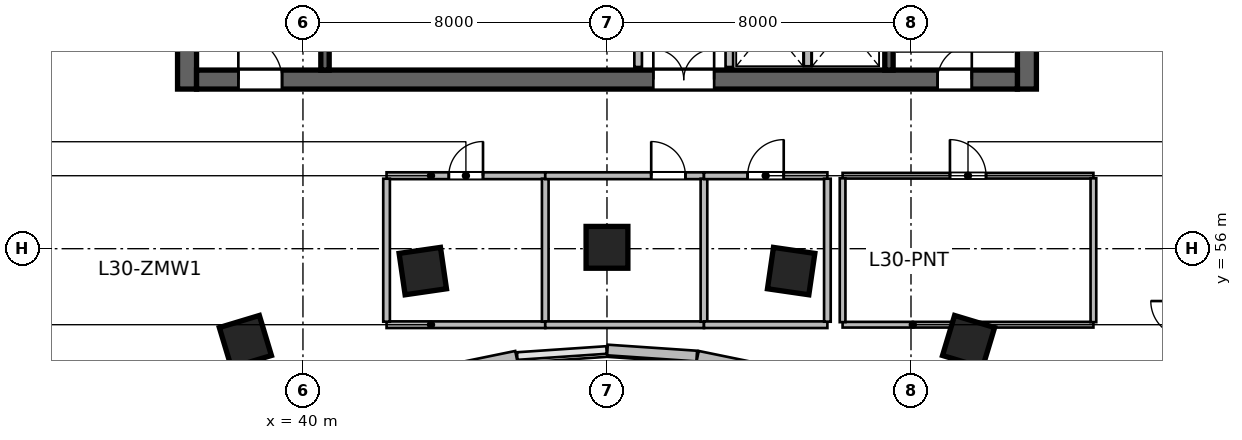
"""IFC4 building model, lengths in metres.
Left out: names, types, materials, properties, quantities, classifications, styles, units other than length and angle.
Written with IfcOpenShell. Run it as: python <this file> out.ifc"""

import sys

from ifc_helpers import new_model, si_unit, direction, frame, frame_2d, origin, origin_2d, place, context, subcontext, project, spatial, rectangle, extrude, source, transform, mapped, element, fill, save


model = new_model("IFC4")
c1 = context("Model", 3, precision=1e-05, world=origin(), true_north=direction((0.0, 1.0)))
c2 = subcontext(c1, "Body", "Model", "MODEL_VIEW")
j1 = project(units=[si_unit("LENGTHUNIT", "METRE"), si_unit("PLANEANGLEUNIT", "RADIAN")], contexts=[c1])
p1 = place(None, origin())
s1 = spatial("IfcSite", under=j1, at=p1, CompositionType="ELEMENT")
p2 = place(p1, origin())
s2 = spatial("IfcBuilding", under=s1, at=p2, CompositionType="ELEMENT")
p3 = place(p2, frame((0.0, 0.0, 127.2)))
s3 = spatial("IfcBuildingStorey", under=s2, at=p3, CompositionType="ELEMENT", Elevation=127.2)
m1 = source(origin(), c2, "Body", "SweptSolid", [
    extrude(rectangle(XDim=12.0, YDim=0.5, at=frame_2d((6.0, 0.0))), origin(), (0.0, 0.0, 1.0), 3.9),
])
for number, where, z_axis, x_axis in (
    (1, (36.95, 60.2, 0.0), (0.0, 0.0, 1.0), (0.0, 1.0, 0.0)),
    (2, (59.05, 60.2, 0.0), (0.0, 0.0, 1.0), (0.0, 1.0, 0.0)),
):
    element("IfcWall", number, at=place(p3, frame(where, z_axis=z_axis, x_axis=x_axis)), inside=s3, PredefinedType="SHEAR", context=c2, shape_type="MappedRepresentation", body=[
        mapped(m1, transform((0.0, 0.0, 0.0), scale=1.0)),
    ])
m2 = source(origin(), c2, "Body", "SweptSolid", [
    extrude(rectangle(XDim=21.6, YDim=0.5, at=frame_2d((10.8, 0.0))), origin(), (0.0, 0.0, 1.0), 3.9),
])
p4 = place(p3, frame((37.2, 60.45, 0.0), z_axis=(0.0, 0.0, 1.0), x_axis=(1.0, 0.0, 0.0)))
e3 = element("IfcWall", 3, at=p4, inside=s3, PredefinedType="SHEAR", context=c2, shape_type="MappedRepresentation", body=[
    mapped(m2, transform((0.0, 0.0, 0.0), scale=1.0)),
])
p5 = place(p4, frame((1.1, 0.0, 0.0)))
e4 = element("IfcOpeningElement", 4, at=p5, cuts=e3, PredefinedType="OPENING", context=c2, shape_type="SweptSolid", body=[
    extrude(rectangle(XDim=1.15, YDim=2.15, at=frame_2d((0.575, 1.075))), frame((0.0, 0.26, 0.0), z_axis=(0.0, -1.0, 0.0), x_axis=(1.0, 0.0, 0.0)), (0.0, 0.0, 1.0), 0.52),
])
p6 = place(p4, frame((19.5, 0.0, 0.0)))
e5 = element("IfcOpeningElement", 5, at=p6, cuts=e3, PredefinedType="OPENING", context=c2, shape_type="SweptSolid", body=[
    extrude(rectangle(XDim=0.9, YDim=2.1, at=frame_2d((0.45, 1.05))), frame((0.0, 0.26, 0.0), z_axis=(0.0, -1.0, 0.0), x_axis=(1.0, 0.0, 0.0)), (0.0, 0.0, 1.0), 0.52),
])
p7 = place(p4, frame((12.02, 0.0, 0.0)))
e6 = element("IfcOpeningElement", 6, at=p7, cuts=e3, PredefinedType="OPENING", context=c2, shape_type="SweptSolid", body=[
    extrude(rectangle(XDim=1.6, YDim=2.15, at=frame_2d((0.8, 1.075))), frame((0.0, 0.26, 0.0), z_axis=(0.0, -1.0, 0.0), x_axis=(1.0, 0.0, 0.0)), (0.0, 0.0, 1.0), 0.52),
])
m3 = source(origin(), c2, "Body", "SweptSolid", [
    extrude(rectangle(XDim=11.0, YDim=0.22, at=frame_2d((5.5, 0.0))), origin(), (0.0, 0.0, 1.0), 3.9),
])
p8 = place(p3, frame((40.58, 60.7, 0.0), z_axis=(0.0, 0.0, 1.0), x_axis=(0.0, 1.0, 0.0)))
e7 = element("IfcWall", 7, at=p8, inside=s3, PredefinedType="SHEAR", context=c2, shape_type="MappedRepresentation", body=[
    mapped(m3, transform((0.0, 0.0, 0.0), scale=1.0)),
])
p9 = place(p3, frame((55.42, 60.7, 0.0), z_axis=(0.0, 0.0, 1.0), x_axis=(0.0, 1.0, 0.0)))
e8 = element("IfcWall", 8, at=p9, inside=s3, PredefinedType="SHEAR", context=c2, shape_type="MappedRepresentation", body=[
    mapped(m3, transform((0.0, 0.0, 0.0), scale=1.0)),
])
p10 = place(p9, frame((9.545, 0.0, 0.0)))
e9 = element("IfcOpeningElement", 9, at=p10, cuts=e8, PredefinedType="OPENING", context=c2, shape_type="SweptSolid", body=[
    extrude(rectangle(XDim=1.15, YDim=2.15, at=frame_2d((0.575, 1.075))), frame((0.0, 0.12, 0.0), z_axis=(0.0, -1.0, 0.0), x_axis=(1.0, 0.0, 0.0)), (0.0, 0.0, 1.0), 0.24),
])
m4 = source(origin(), c2, "Body", "SweptSolid", [
    extrude(rectangle(XDim=1.1, YDim=1.1, at=origin_2d()), origin(), (0.0, 0.0, 1.0), 3.9),
])
for number, where, z_axis, x_axis in (
    (10, (38.485, 53.558, 0.0), (0.0, 0.0, 1.0), (-0.289, 0.957, 0.0)),
    (11, (43.154, 55.411, 0.0), (0.0, 0.0, 1.0), (-0.143, 0.99, 0.0)),
    (12, (48.0, 56.036, 0.0), (0.0, 0.0, 1.0), (0.0, 1.0, 0.0)),
    (13, (52.846, 55.411, 0.0), (0.0, 0.0, 1.0), (0.143, 0.99, 0.0)),
    (14, (57.515, 53.558, 0.0), (0.0, 0.0, 1.0), (0.289, 0.957, 0.0)),
):
    element("IfcColumn", number, at=place(p3, frame(where, z_axis=z_axis, x_axis=x_axis)), inside=s3, PredefinedType="COLUMN", context=c2, shape_type="MappedRepresentation", body=[
        mapped(m4, transform((0.0, 0.0, 0.0), scale=1.0)),
    ])
m5 = source(origin(), c2, "Body", "SweptSolid", [
    extrude(rectangle(XDim=2.374, YDim=0.28, at=frame_2d((1.187, 0.0))), origin(), (0.0, 0.0, 1.0), 3.65),
])
p11 = place(p3, frame((52.711, 52.695, 0.0), z_axis=(0.0, 0.0, 1.0), x_axis=(-0.979619827472, 0.200860632341, 0.0)))
e15 = element("IfcWall", 15, at=p11, inside=s3, PredefinedType="SOLIDWALL", context=c2, shape_type="MappedRepresentation", body=[
    mapped(m5, transform((0.0, 0.0, 0.0), scale=1.0)),
])
m6 = source(origin(), c2, "Body", "SweptSolid", [
    extrude(rectangle(XDim=2.355, YDim=0.28, at=frame_2d((1.177, 0.0))), origin(), (0.0, 0.0, 1.0), 3.65),
])
p12 = place(p3, frame((50.362, 53.175, 0.0), z_axis=(0.0, 0.0, 1.0), x_axis=(-0.997699017577, 0.067798748701, 0.0)))
e16 = element("IfcWall", 16, at=p12, inside=s3, PredefinedType="SOLIDWALL", context=c2, shape_type="MappedRepresentation", body=[
    mapped(m6, transform((0.0, 0.0, 0.0), scale=1.0)),
])
p13 = place(p3, frame((45.614, 53.172, 0.0), z_axis=(0.0, 0.0, 1.0), x_axis=(-0.979619827472, -0.200860632341, 0.0)))
e17 = element("IfcWall", 17, at=p13, inside=s3, PredefinedType="SOLIDWALL", context=c2, shape_type="MappedRepresentation", body=[
    mapped(m5, transform((0.0, 0.0, 0.0), scale=1.0)),
])
m7 = source(origin(), c2, "Body", "SweptSolid", [
    extrude(rectangle(XDim=2.24, YDim=0.2, at=frame_2d((1.12, 0.0))), origin(), (0.0, 0.0, 1.0), 3.65),
])
for number, where, z_axis, x_axis in (
    (18, (48.82, 60.78, 0.0), (0.0, 0.0, 1.0), (0.0, 1.0, 0.0)),
    (19, (51.22, 60.78, 0.0), (0.0, 0.0, 1.0), (0.0, 1.0, 0.0)),
):
    element("IfcWall", number, at=place(p3, frame(where, z_axis=z_axis, x_axis=x_axis)), inside=s3, PredefinedType="SOLIDWALL", context=c2, shape_type="MappedRepresentation", body=[
        mapped(m7, transform((0.0, 0.0, 0.0), scale=1.0)),
    ])
m8 = source(origin(), c2, "Body", "SweptSolid", [
    extrude(rectangle(XDim=2.2, YDim=0.2, at=frame_2d((1.1, 0.0))), origin(), (0.0, 0.0, 1.0), 3.65),
])
p14 = place(p3, frame((53.28, 60.8, 0.0), z_axis=(0.0, 0.0, 1.0), x_axis=(0.0, 1.0, 0.0)))
e20 = element("IfcWall", 20, at=p14, inside=s3, PredefinedType="SOLIDWALL", context=c2, shape_type="MappedRepresentation", body=[
    mapped(m8, transform((0.0, 0.0, 0.0), scale=1.0)),
])
m9 = source(origin(), c2, "Body", "SweptSolid", [
    extrude(rectangle(XDim=4.176, YDim=0.175, at=frame_2d((2.088, 0.0))), origin(), (0.0, 0.0, 1.0), 3.65),
])
p15 = place(p3, frame((42.2, 54.0, 0.0), z_axis=(0.0, 0.0, 1.0), x_axis=(1.0, 0.0, 0.0)))
e21 = element("IfcWall", 21, at=p15, inside=s3, PredefinedType="PARTITIONING", context=c2, shape_type="MappedRepresentation", body=[
    mapped(m9, transform((0.0, 0.0, 0.0), scale=1.0)),
])
m10 = source(origin(), c2, "Body", "SweptSolid", [
    extrude(rectangle(XDim=4.176, YDim=0.18, at=frame_2d((2.088, 0.0))), origin(), (0.0, 0.0, 1.0), 3.65),
])
p16 = place(p3, frame((42.2, 57.92, 0.0), z_axis=(0.0, 0.0, 1.0), x_axis=(1.0, 0.0, 0.0)))
e22 = element("IfcWall", 22, at=p16, inside=s3, PredefinedType="PLUMBINGWALL", context=c2, shape_type="MappedRepresentation", body=[
    mapped(m10, transform((0.0, 0.0, 0.0), scale=1.0)),
])
p17 = place(p16, frame((1.638, 0.0, 0.0)))
e23 = element("IfcOpeningElement", 23, at=p17, cuts=e22, PredefinedType="OPENING", context=c2, shape_type="SweptSolid", body=[
    extrude(rectangle(XDim=0.9, YDim=2.08, at=frame_2d((0.45, 1.04))), frame((0.0, 0.1, 0.0), z_axis=(0.0, -1.0, 0.0), x_axis=(1.0, 0.0, 0.0)), (0.0, 0.0, 1.0), 0.2),
])
m11 = source(origin(), c2, "Body", "SweptSolid", [
    extrude(rectangle(XDim=3.763, YDim=0.175, at=frame_2d((1.881, 0.0))), origin(), (0.0, 0.0, 1.0), 3.65),
])
for number, where, z_axis, x_axis in (
    (24, (42.2, 54.079, 0.0), (0.0, 0.0, 1.0), (0.0, 1.0, 0.0)),
    (25, (46.376, 54.079, 0.0), (0.0, 0.0, 1.0), (0.0, 1.0, 0.0)),
):
    element("IfcWall", number, at=place(p3, frame(where, z_axis=z_axis, x_axis=x_axis)), inside=s3, PredefinedType="PARTITIONING", context=c2, shape_type="MappedRepresentation", body=[
        mapped(m11, transform((0.0, 0.0, 0.0), scale=1.0)),
    ])
p18 = place(p3, frame((46.376, 54.0, 0.0), z_axis=(0.0, 0.0, 1.0), x_axis=(1.0, 0.0, 0.0)))
e26 = element("IfcWall", 26, at=p18, inside=s3, PredefinedType="PARTITIONING", context=c2, shape_type="MappedRepresentation", body=[
    mapped(m9, transform((0.0, 0.0, 0.0), scale=1.0)),
])
p19 = place(p3, frame((46.376, 57.92, 0.0), z_axis=(0.0, 0.0, 1.0), x_axis=(1.0, 0.0, 0.0)))
e27 = element("IfcWall", 27, at=p19, inside=s3, PredefinedType="PLUMBINGWALL", context=c2, shape_type="MappedRepresentation", body=[
    mapped(m10, transform((0.0, 0.0, 0.0), scale=1.0)),
])
p20 = place(p19, frame((2.788, 0.0, 0.0)))
e28 = element("IfcOpeningElement", 28, at=p20, cuts=e27, PredefinedType="OPENING", context=c2, shape_type="SweptSolid", body=[
    extrude(rectangle(XDim=0.9, YDim=2.08, at=frame_2d((0.45, 1.04))), frame((0.0, 0.1, 0.0), z_axis=(0.0, -1.0, 0.0), x_axis=(1.0, 0.0, 0.0)), (0.0, 0.0, 1.0), 0.2),
])
p21 = place(p3, frame((50.552, 54.079, 0.0), z_axis=(0.0, 0.0, 1.0), x_axis=(0.0, 1.0, 0.0)))
e29 = element("IfcWall", 29, at=p21, inside=s3, PredefinedType="PARTITIONING", context=c2, shape_type="MappedRepresentation", body=[
    mapped(m11, transform((0.0, 0.0, 0.0), scale=1.0)),
])
m12 = source(origin(), c2, "Body", "SweptSolid", [
    extrude(rectangle(XDim=3.248, YDim=0.175, at=frame_2d((1.624, 0.0))), origin(), (0.0, 0.0, 1.0), 3.65),
])
p22 = place(p3, frame((50.552, 54.0, 0.0), z_axis=(0.0, 0.0, 1.0), x_axis=(1.0, 0.0, 0.0)))
e30 = element("IfcWall", 30, at=p22, inside=s3, PredefinedType="PARTITIONING", context=c2, shape_type="MappedRepresentation", body=[
    mapped(m12, transform((0.0, 0.0, 0.0), scale=1.0)),
])
m13 = source(origin(), c2, "Body", "SweptSolid", [
    extrude(rectangle(XDim=3.248, YDim=0.18, at=frame_2d((1.624, 0.0))), origin(), (0.0, 0.0, 1.0), 3.65),
])
p23 = place(p3, frame((50.552, 57.92, 0.0), z_axis=(0.0, 0.0, 1.0), x_axis=(1.0, 0.0, 0.0)))
e31 = element("IfcWall", 31, at=p23, inside=s3, PredefinedType="PLUMBINGWALL", context=c2, shape_type="MappedRepresentation", body=[
    mapped(m13, transform((0.0, 0.0, 0.0), scale=1.0)),
])
p24 = place(p23, frame((1.149, 0.0, 0.0)))
e32 = element("IfcOpeningElement", 32, at=p24, cuts=e31, PredefinedType="OPENING", context=c2, shape_type="SweptSolid", body=[
    extrude(rectangle(XDim=0.95, YDim=2.12, at=frame_2d((0.475, 1.06))), frame((0.0, 0.1, 0.0), z_axis=(0.0, -1.0, 0.0), x_axis=(1.0, 0.0, 0.0)), (0.0, 0.0, 1.0), 0.2),
])
p25 = place(p3, frame((53.8, 54.079, 0.0), z_axis=(0.0, 0.0, 1.0), x_axis=(0.0, 1.0, 0.0)))
e33 = element("IfcWall", 33, at=p25, inside=s3, PredefinedType="PARTITIONING", context=c2, shape_type="MappedRepresentation", body=[
    mapped(m11, transform((0.0, 0.0, 0.0), scale=1.0)),
])
m14 = source(origin(), c2, "Body", "SweptSolid", [
    extrude(rectangle(XDim=6.6, YDim=0.15, at=frame_2d((3.3, 0.0))), origin(), (0.0, 0.0, 1.0), 3.095),
])
p26 = place(p3, frame((54.2, 54.0, 0.0), z_axis=(0.0, 0.0, 1.0), x_axis=(1.0, 0.0, 0.0)))
e34 = element("IfcWall", 34, at=p26, inside=s3, PredefinedType="PARTITIONING", context=c2, shape_type="MappedRepresentation", body=[
    mapped(m14, transform((0.0, 0.0, 0.0), scale=1.0)),
])
m15 = source(origin(), c2, "Body", "SweptSolid", [
    extrude(rectangle(XDim=6.6, YDim=0.15, at=frame_2d((3.3, 0.0))), origin(), (0.0, 0.0, 1.0), 3.65),
])
p27 = place(p3, frame((54.2, 57.92, 0.0), z_axis=(0.0, 0.0, 1.0), x_axis=(1.0, 0.0, 0.0)))
e35 = element("IfcWall", 35, at=p27, inside=s3, PredefinedType="PARTITIONING", context=c2, shape_type="MappedRepresentation", body=[
    mapped(m15, transform((0.0, 0.0, 0.0), scale=1.0)),
])
p28 = place(p27, frame((2.825, 0.0, 0.0)))
e36 = element("IfcOpeningElement", 36, at=p28, cuts=e35, PredefinedType="OPENING", context=c2, shape_type="SweptSolid", body=[
    extrude(rectangle(XDim=0.95, YDim=2.1, at=frame_2d((0.475, 1.05))), frame((0.0, 0.085, 0.0), z_axis=(0.0, -1.0, 0.0), x_axis=(1.0, 0.0, 0.0)), (0.0, 0.0, 1.0), 0.17),
])
m16 = source(origin(), c2, "Body", "SweptSolid", [
    extrude(rectangle(XDim=3.785, YDim=0.15, at=frame_2d((1.893, 0.0))), origin(), (0.0, 0.0, 1.0), 3.65),
])
for number, where, z_axis, x_axis in (
    (37, (54.2, 54.067, 0.0), (0.0, 0.0, 1.0), (0.0, 1.0, 0.0)),
    (38, (60.8, 54.067, 0.0), (0.0, 0.0, 1.0), (0.0, 1.0, 0.0)),
):
    element("IfcWall", number, at=place(p3, frame(where, z_axis=z_axis, x_axis=x_axis)), inside=s3, PredefinedType="PARTITIONING", context=c2, shape_type="MappedRepresentation", body=[
        mapped(m16, transform((0.0, 0.0, 0.0), scale=1.0)),
    ])
m17 = source(origin(), c2, "Body", "SweptSolid", [
    extrude(rectangle(XDim=1.15, YDim=2.15, at=frame_2d((0.575, 1.075))), frame((0.0, 0.025, 0.0), z_axis=(0.0, -1.0, 0.0), x_axis=(1.0, 0.0, 0.0)), (0.0, 0.0, 1.0), 0.05),
])
p29 = place(p5, origin())
e39 = element("IfcDoor", 39, at=p29, inside=s3, OperationType="SINGLE_SWING_LEFT", PredefinedType="DOOR", context=c2, shape_type="MappedRepresentation", body=[
    mapped(m17, transform((0.0, 0.0, 0.0), scale=1.0)),
])
fill(e4, e39)
m18 = source(origin(), c2, "Body", "SweptSolid", [
    extrude(rectangle(XDim=0.9, YDim=2.1, at=frame_2d((0.45, 1.05))), frame((0.0, 0.025, 0.0), z_axis=(0.0, -1.0, 0.0), x_axis=(1.0, 0.0, 0.0)), (0.0, 0.0, 1.0), 0.05),
])
p30 = place(p6, origin())
e40 = element("IfcDoor", 40, at=p30, inside=s3, OperationType="SINGLE_SWING_RIGHT", PredefinedType="DOOR", context=c2, shape_type="MappedRepresentation", body=[
    mapped(m18, transform((0.0, 0.0, 0.0), scale=1.0)),
])
fill(e5, e40)
m19 = source(origin(), c2, "Body", "SweptSolid", [
    extrude(rectangle(XDim=1.6, YDim=2.15, at=frame_2d((0.8, 1.075))), frame((0.0, 0.025, 0.0), z_axis=(0.0, -1.0, 0.0), x_axis=(1.0, 0.0, 0.0)), (0.0, 0.0, 1.0), 0.05),
])
p31 = place(p7, origin())
e41 = element("IfcDoor", 41, at=p31, inside=s3, OperationType="DOUBLE_DOOR_SINGLE_SWING", PredefinedType="DOOR", context=c2, shape_type="MappedRepresentation", body=[
    mapped(m19, transform((0.0, 0.0, 0.0), scale=1.0)),
])
fill(e6, e41)
m20 = source(origin(), c2, "Body", "SweptSolid", [
    extrude(rectangle(XDim=0.9, YDim=2.08, at=frame_2d((0.45, 1.04))), frame((0.0, 0.025, 0.0), z_axis=(0.0, -1.0, 0.0), x_axis=(1.0, 0.0, 0.0)), (0.0, 0.0, 1.0), 0.05),
])
p32 = place(p17, origin())
e42 = element("IfcDoor", 42, at=p32, inside=s3, OperationType="SINGLE_SWING_RIGHT", PredefinedType="DOOR", context=c2, shape_type="MappedRepresentation", body=[
    mapped(m20, transform((0.0, 0.0, 0.0), scale=1.0)),
])
fill(e23, e42)
p33 = place(p20, origin())
e43 = element("IfcDoor", 43, at=p33, inside=s3, OperationType="SINGLE_SWING_LEFT", PredefinedType="DOOR", context=c2, shape_type="MappedRepresentation", body=[
    mapped(m20, transform((0.0, 0.0, 0.0), scale=1.0)),
])
fill(e28, e43)
m21 = source(origin(), c2, "Body", "SweptSolid", [
    extrude(rectangle(XDim=0.95, YDim=2.12, at=frame_2d((0.475, 1.06))), frame((0.0, 0.025, 0.0), z_axis=(0.0, -1.0, 0.0), x_axis=(1.0, 0.0, 0.0)), (0.0, 0.0, 1.0), 0.05),
])
p34 = place(p24, origin())
e44 = element("IfcDoor", 44, at=p34, inside=s3, OperationType="SINGLE_SWING_RIGHT", PredefinedType="DOOR", context=c2, shape_type="MappedRepresentation", body=[
    mapped(m21, transform((0.0, 0.0, 0.0), scale=1.0)),
])
fill(e32, e44)
m22 = source(origin(), c2, "Body", "SweptSolid", [
    extrude(rectangle(XDim=0.95, YDim=2.1, at=frame_2d((0.475, 1.05))), frame((0.0, 0.025, 0.0), z_axis=(0.0, -1.0, 0.0), x_axis=(1.0, 0.0, 0.0)), (0.0, 0.0, 1.0), 0.05),
])
p35 = place(p28, origin())
e45 = element("IfcDoor", 45, at=p35, inside=s3, OperationType="SINGLE_SWING_LEFT", PredefinedType="DOOR", context=c2, shape_type="MappedRepresentation", body=[
    mapped(m22, transform((0.0, 0.0, 0.0), scale=1.0)),
])
fill(e36, e45)
save(model, sys.argv[1])
